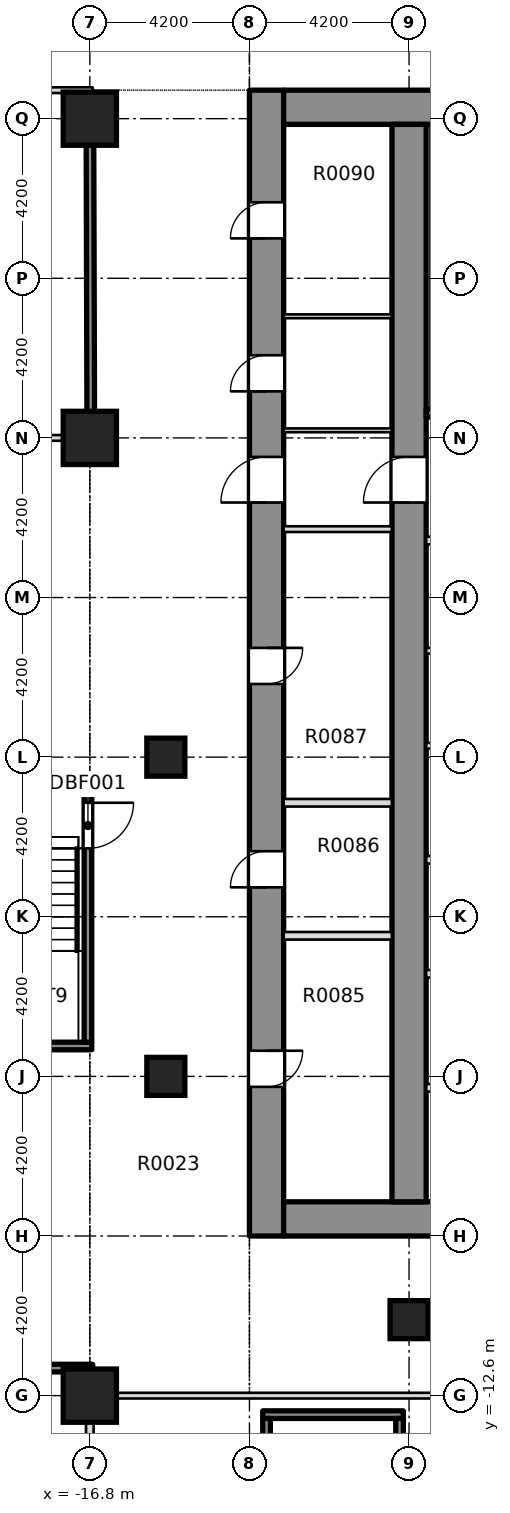
"""IFC4 building model, lengths in metres.
Left out: names, types, materials, properties, quantities, classifications, styles, units other than length and angle.
Written with IfcOpenShell. Run it as: python <this file> out.ifc"""

import sys

from ifc_helpers import new_model, si_unit, direction, frame, frame_2d, origin, origin_2d, place, context, subcontext, project, spatial, rectangle, extrude, element, fill, save


model = new_model("IFC4")
c1 = context("Model", 3, precision=1e-05, world=origin(), true_north=direction((0.0, 1.0)))
c2 = subcontext(c1, "Body", "Model", "MODEL_VIEW")
j1 = project(units=[si_unit("LENGTHUNIT", "METRE"), si_unit("PLANEANGLEUNIT", "RADIAN")], contexts=[c1])
p1 = place(None, origin())
s1 = spatial("IfcSite", under=j1, at=p1, CompositionType="ELEMENT")
p2 = place(p1, origin())
s2 = spatial("IfcBuilding", under=s1, at=p2, CompositionType="ELEMENT")
p3 = place(p2, origin())
s3 = spatial("IfcBuildingStorey", under=s2, at=p3, CompositionType="ELEMENT", Elevation=0.0)
p4 = place(p3, frame((-12.15, -8.4, -0.45), z_axis=(0.0, 0.0, 1.0), x_axis=(0.0, 1.0, 0.0)))
e1 = element("IfcWall", 1, at=p4, inside=s3, PredefinedType="SHEAR", context=c2, shape_type="SweptSolid", body=[
    extrude(rectangle(XDim=30.15, YDim=0.9, at=frame_2d((15.075, 0.0))), origin(), (0.0, 0.0, 1.0), 7.55),
])
p5 = place(p4, frame((3.925, 0.0, 0.45)))
e2 = element("IfcOpeningElement", 2, at=p5, cuts=e1, PredefinedType="OPENING", context=c2, shape_type="SweptSolid", body=[
    extrude(rectangle(XDim=0.95, YDim=2.1, at=frame_2d((0.475, 1.05))), frame((0.0, 0.46, 0.0), z_axis=(0.0, -1.0, 0.0), x_axis=(1.0, 0.0, 0.0)), (0.0, 0.0, 1.0), 0.92),
])
p6 = place(p4, frame((9.175, 0.0, 0.45)))
e3 = element("IfcOpeningElement", 3, at=p6, cuts=e1, PredefinedType="OPENING", context=c2, shape_type="SweptSolid", body=[
    extrude(rectangle(XDim=0.95, YDim=2.1, at=frame_2d((0.475, 1.05))), frame((0.0, 0.46, 0.0), z_axis=(0.0, -1.0, 0.0), x_axis=(1.0, 0.0, 0.0)), (0.0, 0.0, 1.0), 0.92),
])
p7 = place(p4, frame((14.525, 0.0, 0.45)))
e4 = element("IfcOpeningElement", 4, at=p7, cuts=e1, PredefinedType="OPENING", context=c2, shape_type="SweptSolid", body=[
    extrude(rectangle(XDim=0.95, YDim=2.1, at=frame_2d((0.475, 1.05))), frame((0.0, 0.46, 0.0), z_axis=(0.0, -1.0, 0.0), x_axis=(1.0, 0.0, 0.0)), (0.0, 0.0, 1.0), 0.92),
])
p8 = place(p4, frame((22.225, 0.0, 0.45)))
e5 = element("IfcOpeningElement", 5, at=p8, cuts=e1, PredefinedType="OPENING", context=c2, shape_type="SweptSolid", body=[
    extrude(rectangle(XDim=0.95, YDim=2.1, at=frame_2d((0.475, 1.05))), frame((0.0, 0.46, 0.0), z_axis=(0.0, -1.0, 0.0), x_axis=(1.0, 0.0, 0.0)), (0.0, 0.0, 1.0), 0.92),
])
p9 = place(p4, frame((26.25, 0.0, 0.45)))
e6 = element("IfcOpeningElement", 6, at=p9, cuts=e1, PredefinedType="OPENING", context=c2, shape_type="SweptSolid", body=[
    extrude(rectangle(XDim=0.95, YDim=2.1, at=frame_2d((0.475, 1.05))), frame((0.0, 0.46, 0.0), z_axis=(0.0, -1.0, 0.0), x_axis=(1.0, 0.0, 0.0)), (0.0, 0.0, 1.0), 0.92),
])
p10 = place(p4, frame((19.3, 0.0, 0.45)))
e7 = element("IfcOpeningElement", 7, at=p10, cuts=e1, PredefinedType="OPENING", context=c2, shape_type="SweptSolid", body=[
    extrude(rectangle(XDim=1.2, YDim=2.1, at=frame_2d((0.6, 1.05))), frame((0.0, 0.46, 0.0), z_axis=(0.0, -1.0, 0.0), x_axis=(1.0, 0.0, 0.0)), (0.0, 0.0, 1.0), 0.92),
])
p11 = place(p3, frame((-11.7, -7.95, -0.45), z_axis=(0.0, 0.0, 1.0), x_axis=(1.0, 0.0, 0.0)))
e8 = element("IfcWall", 8, at=p11, inside=s3, PredefinedType="SHEAR", context=c2, shape_type="SweptSolid", body=[
    extrude(rectangle(XDim=23.4, YDim=0.9, at=frame_2d((11.7, 0.0))), origin(), (0.0, 0.0, 1.0), 7.55),
])
p12 = place(p11, frame((6.95, 0.0, 0.45)))
e9 = element("IfcOpeningElement", 9, at=p12, cuts=e8, PredefinedType="OPENING", context=c2, shape_type="SweptSolid", body=[
    extrude(rectangle(XDim=1.8, YDim=2.1, at=frame_2d((0.9, 1.05))), frame((0.0, 0.46, 0.0), z_axis=(0.0, -1.0, 0.0), x_axis=(1.0, 0.0, 0.0)), (0.0, 0.0, 1.0), 0.92),
])
p13 = place(p11, frame((14.65, 0.0, 0.45)))
e10 = element("IfcOpeningElement", 10, at=p13, cuts=e8, PredefinedType="OPENING", context=c2, shape_type="SweptSolid", body=[
    extrude(rectangle(XDim=1.8, YDim=2.1, at=frame_2d((0.9, 1.05))), frame((0.0, 0.46, 0.0), z_axis=(0.0, -1.0, 0.0), x_axis=(1.0, 0.0, 0.0)), (0.0, 0.0, 1.0), 0.92),
])
p14 = place(p3, frame((-11.7, 21.3, -0.45), z_axis=(0.0, 0.0, 1.0), x_axis=(1.0, 0.0, 0.0)))
e11 = element("IfcWall", 11, at=p14, inside=s3, PredefinedType="SOLIDWALL", context=c2, shape_type="SweptSolid", body=[
    extrude(rectangle(XDim=23.4, YDim=0.9, at=frame_2d((11.7, 0.0))), origin(), (0.0, 0.0, 1.0), 7.55),
])
p15 = place(p14, frame((11.1, 0.0, 0.45)))
e12 = element("IfcOpeningElement", 12, at=p15, cuts=e11, PredefinedType="OPENING", context=c2, shape_type="SweptSolid", body=[
    extrude(rectangle(XDim=1.2, YDim=2.1, at=frame_2d((0.6, 1.05))), frame((0.0, 0.46, 0.0), z_axis=(0.0, -1.0, 0.0), x_axis=(1.0, 0.0, 0.0)), (0.0, 0.0, 1.0), 0.92),
])
p16 = place(p3, frame((-8.4, -7.5, -0.45), z_axis=(0.0, 0.0, 1.0), x_axis=(0.0, 1.0, 0.0)))
e13 = element("IfcWall", 13, at=p16, inside=s3, PredefinedType="SHEAR", context=c2, shape_type="SweptSolid", body=[
    extrude(rectangle(XDim=28.35, YDim=0.9, at=frame_2d((14.175, 0.0))), origin(), (0.0, 0.0, 1.0), 7.55),
])
p17 = place(p16, frame((18.4, 0.0, 0.45)))
e14 = element("IfcOpeningElement", 14, at=p17, cuts=e13, PredefinedType="OPENING", context=c2, shape_type="SweptSolid", body=[
    extrude(rectangle(XDim=1.2, YDim=2.1, at=frame_2d((0.6, 1.05))), frame((0.0, 0.46, 0.0), z_axis=(0.0, -1.0, 0.0), x_axis=(1.0, 0.0, 0.0)), (0.0, 0.0, 1.0), 0.92),
])
for number, where, z_axis, x_axis in (
    (15, (-16.8, -12.6, -0.45), (0.0, 0.0, 1.0), (1.0, 0.0, 0.0)),
    (16, (-16.8, 12.6, -0.45), (0.0, 0.0, 1.0), (1.0, 0.0, 0.0)),
    (17, (-16.8, 21.0, -0.45), (0.0, 0.0, 1.0), (1.0, 0.0, 0.0)),
):
    element("IfcColumn", number, at=place(p3, frame(where, z_axis=z_axis, x_axis=x_axis)), inside=s3, PredefinedType="COLUMN", context=c2, shape_type="SweptSolid", body=[
        extrude(rectangle(XDim=1.4, YDim=1.4, at=origin_2d()), origin(), (0.0, 0.0, 1.0), 7.55),
    ])
for number, where, z_axis, x_axis in (
    (18, (-8.4, -10.6, -0.45), (0.0, 0.0, 1.0), (1.0, 0.0, 0.0)),
    (19, (-14.8, -4.2, -0.45), (0.0, 0.0, 1.0), (1.0, 0.0, 0.0)),
    (20, (-14.8, 4.2, -0.45), (0.0, 0.0, 1.0), (1.0, 0.0, 0.0)),
):
    element("IfcColumn", number, at=place(p3, frame(where, z_axis=z_axis, x_axis=x_axis)), inside=s3, PredefinedType="COLUMN", context=c2, shape_type="SweptSolid", body=[
        extrude(rectangle(XDim=1.0, YDim=1.0, at=origin_2d()), origin(), (0.0, 0.0, 1.0), 7.55),
    ])
p18 = place(p3, frame((-16.9, -12.6, 0.0), z_axis=(0.0, 0.0, 1.0), x_axis=(1.0, 0.0, 0.0)))
e21 = element("IfcWall", 21, at=p18, inside=s3, PredefinedType="PARTITIONING", context=c2, shape_type="SweptSolid", body=[
    extrude(rectangle(XDim=9.625, YDim=0.15, at=frame_2d((4.812, 0.0))), origin(), (0.0, 0.0, 1.0), 7.1),
])
p19 = place(p3, frame((-34.15, -11.875, 0.0), z_axis=(0.0, 0.0, 1.0), x_axis=(1.0, 0.0, 0.0)))
e22 = element("IfcWall", 22, at=p19, inside=s3, PredefinedType="SOLIDWALL", context=c2, shape_type="SweptSolid", body=[
    extrude(rectangle(XDim=17.425, YDim=0.2, at=frame_2d((8.712, 0.0))), origin(), (0.0, 0.0, 1.0), 7.1),
])
p20 = place(p19, frame((2.45, 0.0, 0.0)))
e23 = element("IfcOpeningElement", 23, at=p20, cuts=e22, PredefinedType="OPENING", context=c2, shape_type="SweptSolid", body=[
    extrude(rectangle(XDim=0.9, YDim=2.1, at=frame_2d((0.45, 1.05))), frame((0.0, 0.11, 0.0), z_axis=(0.0, -1.0, 0.0), x_axis=(1.0, 0.0, 0.0)), (0.0, 0.0, 1.0), 0.22),
])
p21 = place(p3, frame((-34.15, 12.6, 0.0), z_axis=(0.0, 0.0, 1.0), x_axis=(1.0, 0.0, 0.0)))
e24 = element("IfcWall", 24, at=p21, inside=s3, PredefinedType="PARTITIONING", context=c2, shape_type="SweptSolid", body=[
    extrude(rectangle(XDim=17.425, YDim=0.15, at=frame_2d((8.712, 0.0))), origin(), (0.0, 0.0, 1.0), 7.1),
])
p22 = place(p21, frame((10.65, 0.0, 0.0)))
e25 = element("IfcOpeningElement", 25, at=p22, cuts=e24, PredefinedType="OPENING", context=c2, shape_type="SweptSolid", body=[
    extrude(rectangle(XDim=0.9, YDim=2.1, at=frame_2d((0.45, 1.05))), frame((0.0, 0.085, 0.0), z_axis=(0.0, -1.0, 0.0), x_axis=(1.0, 0.0, 0.0)), (0.0, 0.0, 1.0), 0.17),
])
p23 = place(p3, frame((-34.15, 21.75, 0.0), z_axis=(0.0, 0.0, 1.0), x_axis=(1.0, 0.0, 0.0)))
e26 = element("IfcWall", 26, at=p23, inside=s3, PredefinedType="PARTITIONING", context=c2, shape_type="SweptSolid", body=[
    extrude(rectangle(XDim=17.425, YDim=0.15, at=frame_2d((8.712, 0.0))), origin(), (0.0, 0.0, 1.0), 7.1),
])
p24 = place(p23, frame((4.05, 0.0, 0.0)))
e27 = element("IfcOpeningElement", 27, at=p24, cuts=e26, PredefinedType="OPENING", context=c2, shape_type="SweptSolid", body=[
    extrude(rectangle(XDim=0.9, YDim=2.1, at=frame_2d((0.45, 1.05))), frame((0.0, 0.085, 0.0), z_axis=(0.0, -1.0, 0.0), x_axis=(1.0, 0.0, 0.0)), (0.0, 0.0, 1.0), 0.17),
])
p25 = place(p23, frame((14.825, 0.0, 0.0)))
e28 = element("IfcOpeningElement", 28, at=p25, cuts=e26, PredefinedType="OPENING", context=c2, shape_type="SweptSolid", body=[
    extrude(rectangle(XDim=0.9, YDim=2.1, at=frame_2d((0.45, 1.05))), frame((0.0, 0.085, 0.0), z_axis=(0.0, -1.0, 0.0), x_axis=(1.0, 0.0, 0.0)), (0.0, 0.0, 1.0), 0.17),
])
p26 = place(p3, frame((-16.8, -18.125, 0.0), z_axis=(0.0, 0.0, 1.0), x_axis=(0.0, 1.0, 0.0)))
e29 = element("IfcWall", 29, at=p26, inside=s3, PredefinedType="PARTITIONING", context=c2, shape_type="SweptSolid", body=[
    extrude(rectangle(XDim=5.45, YDim=0.2, at=frame_2d((2.725, 0.0))), origin(), (0.0, 0.0, 1.0), 7.1),
])
p27 = place(p3, frame((-16.775, -12.525, 0.0), z_axis=(0.0, 0.0, 1.0), x_axis=(-0.043289881256, 0.999062553688, 0.0)))
e30 = element("IfcWall", 30, at=p27, inside=s3, PredefinedType="SOLIDWALL", context=c2, shape_type="SweptSolid", body=[
    extrude(rectangle(XDim=0.575, YDim=0.2, at=frame_2d((0.288, 0.0))), origin(), (0.0, 0.0, 1.0), 7.1),
])
p28 = place(p3, frame((-16.775, 12.675, 0.0), z_axis=(0.0, 0.0, 1.0), x_axis=(-0.002759281819, 0.999996193175, 0.0)))
e31 = element("IfcWall", 31, at=p28, inside=s3, PredefinedType="SOLIDWALL", context=c2, shape_type="SweptSolid", body=[
    extrude(rectangle(XDim=9.025, YDim=0.2, at=frame_2d((4.512, 0.0))), origin(), (0.0, 0.0, 1.0), 7.1),
])
for number, where, z_axis, x_axis in (
    (32, (-7.949, -4.5, 0.0), (0.0, 0.0, 1.0), (1.0, 0.0, 0.0)),
    (33, (-7.949, -1.5, 0.0), (0.0, 0.0, 1.0), (1.0, 0.0, 0.0)),
    (34, (-7.949, 1.5, 0.0), (0.0, 0.0, 1.0), (1.0, 0.0, 0.0)),
):
    element("IfcWall", number, at=place(p3, frame(where, z_axis=z_axis, x_axis=x_axis)), inside=s3, PredefinedType="PARTITIONING", context=c2, shape_type="SweptSolid", body=[
        extrude(rectangle(XDim=2.374, YDim=0.2, at=frame_2d((1.187, 0.0))), origin(), (0.0, 0.0, 1.0), 7.1),
    ])
p29 = place(p3, frame((-7.949, 4.5, 0.0), z_axis=(0.0, 0.0, 1.0), x_axis=(1.0, 0.0, 0.0)))
e35 = element("IfcWall", 35, at=p29, inside=s3, PredefinedType="PARTITIONING", context=c2, shape_type="SweptSolid", body=[
    extrude(rectangle(XDim=2.524, YDim=0.15, at=frame_2d((1.262, 0.0))), origin(), (0.0, 0.0, 1.0), 7.1),
])
p30 = place(p3, frame((-7.949, 7.0, 0.0), z_axis=(0.0, 0.0, 1.0), x_axis=(1.0, 0.0, 0.0)))
e36 = element("IfcWall", 36, at=p30, inside=s3, PredefinedType="PARTITIONING", context=c2, shape_type="SweptSolid", body=[
    extrude(rectangle(XDim=15.898, YDim=0.15, at=frame_2d((7.949, 0.0))), origin(), (0.0, 0.0, 1.0), 7.1),
])
p31 = place(p30, frame((7.249, 0.0, 0.0)))
e37 = element("IfcOpeningElement", 37, at=p31, cuts=e36, PredefinedType="OPENING", context=c2, shape_type="SweptSolid", body=[
    extrude(rectangle(XDim=1.4, YDim=2.1, at=frame_2d((0.7, 1.05))), frame((0.0, 0.085, 0.0), z_axis=(0.0, -1.0, 0.0), x_axis=(1.0, 0.0, 0.0)), (0.0, 0.0, 1.0), 0.17),
])
p32 = place(p3, frame((-7.949, 9.9, 0.0), z_axis=(0.0, 0.0, 1.0), x_axis=(1.0, 0.0, 0.0)))
e38 = element("IfcWall", 38, at=p32, inside=s3, PredefinedType="PARTITIONING", context=c2, shape_type="SweptSolid", body=[
    extrude(rectangle(XDim=4.349, YDim=0.2, at=frame_2d((2.174, 0.0))), origin(), (0.0, 0.0, 1.0), 7.1),
])
p33 = place(p32, frame((0.999, 0.0, 0.0)))
e39 = element("IfcOpeningElement", 39, at=p33, cuts=e38, PredefinedType="OPENING", context=c2, shape_type="SweptSolid", body=[
    extrude(rectangle(XDim=1.1, YDim=2.1, at=frame_2d((0.55, 1.05))), frame((0.0, 0.11, 0.0), z_axis=(0.0, -1.0, 0.0), x_axis=(1.0, 0.0, 0.0)), (0.0, 0.0, 1.0), 0.22),
])
p34 = place(p3, frame((-7.949, 13.25, 0.0), z_axis=(0.0, 0.0, 1.0), x_axis=(1.0, 0.0, 0.0)))
e40 = element("IfcWall", 40, at=p34, inside=s3, PredefinedType="SOLIDWALL", context=c2, shape_type="SweptSolid", body=[
    extrude(rectangle(XDim=4.524, YDim=0.2, at=frame_2d((2.262, 0.0))), origin(), (0.0, 0.0, 1.0), 7.1),
])
p35 = place(p34, frame((1.499, 0.0, 0.0)))
e41 = element("IfcOpeningElement", 41, at=p35, cuts=e40, PredefinedType="OPENING", context=c2, shape_type="SweptSolid", body=[
    extrude(rectangle(XDim=1.2, YDim=2.1, at=frame_2d((0.6, 1.05))), frame((0.0, 0.11, 0.0), z_axis=(0.0, -1.0, 0.0), x_axis=(1.0, 0.0, 0.0)), (0.0, 0.0, 1.0), 0.22),
])
for number, where, z_axis, x_axis in (
    (42, (-11.699, -0.5, 0.0), (0.0, 0.0, 1.0), (1.0, 0.0, 0.0)),
    (43, (-11.699, 3.0, 0.0), (0.0, 0.0, 1.0), (1.0, 0.0, 0.0)),
):
    element("IfcWall", number, at=place(p3, frame(where, z_axis=z_axis, x_axis=x_axis)), inside=s3, PredefinedType="PARTITIONING", context=c2, shape_type="SweptSolid", body=[
        extrude(rectangle(XDim=2.848, YDim=0.2, at=frame_2d((1.424, 0.0))), origin(), (0.0, 0.0, 1.0), 7.1),
    ])
p36 = place(p3, frame((-11.699, 10.2, 0.0), z_axis=(0.0, 0.0, 1.0), x_axis=(1.0, 0.0, 0.0)))
e44 = element("IfcWall", 44, at=p36, inside=s3, PredefinedType="PARTITIONING", context=c2, shape_type="SweptSolid", body=[
    extrude(rectangle(XDim=2.848, YDim=0.15, at=frame_2d((1.424, 0.0))), origin(), (0.0, 0.0, 1.0), 7.1),
])
for number, where, z_axis, x_axis in (
    (45, (-11.699, 12.8, 0.0), (0.0, 0.0, 1.0), (1.0, 0.0, 0.0)),
    (46, (-11.699, 15.8, 0.0), (0.0, 0.0, 1.0), (1.0, 0.0, 0.0)),
):
    element("IfcWall", number, at=place(p3, frame(where, z_axis=z_axis, x_axis=x_axis)), inside=s3, PredefinedType="PARTITIONING", context=c2, shape_type="SweptSolid", body=[
        extrude(rectangle(XDim=2.848, YDim=0.1, at=frame_2d((1.424, 0.0))), origin(), (0.0, 0.0, 1.0), 7.1),
    ])
p37 = place(p3, frame((-12.25, -13.1, 0.0), z_axis=(0.0, 0.0, 1.0), x_axis=(1.0, 0.0, 0.0)))
e47 = element("IfcWall", 47, at=p37, inside=s3, PredefinedType="SOLIDWALL", context=c2, shape_type="SweptSolid", body=[
    extrude(rectangle(XDim=3.7, YDim=0.2, at=frame_2d((1.85, 0.0))), origin(), (0.0, 0.0, 1.0), 7.1),
])
p38 = place(p3, frame((-12.15, -19.8, 0.0), z_axis=(0.0, 0.0, 1.0), x_axis=(0.0, 1.0, 0.0)))
e48 = element("IfcWall", 48, at=p38, inside=s3, PredefinedType="SOLIDWALL", context=c2, shape_type="SweptSolid", body=[
    extrude(rectangle(XDim=6.6, YDim=0.2, at=frame_2d((3.3, 0.0))), origin(), (0.0, 0.0, 1.0), 7.1),
])
p39 = place(p3, frame((-8.65, -20.3, 0.0), z_axis=(0.0, 0.0, 1.0), x_axis=(0.0, 1.0, 0.0)))
e49 = element("IfcWall", 49, at=p39, inside=s3, PredefinedType="SOLIDWALL", context=c2, shape_type="SweptSolid", body=[
    extrude(rectangle(XDim=7.1, YDim=0.2, at=frame_2d((3.55, 0.0))), origin(), (0.0, 0.0, 1.0), 7.1),
])
for number, where, z_axis, x_axis in (
    (50, (-20.45, -3.4, 0.0), (0.0, 0.0, 1.0), (1.0, 0.0, 0.0)),
    (51, (-20.45, 3.4, 0.0), (0.0, 0.0, 1.0), (1.0, 0.0, 0.0)),
):
    element("IfcWall", number, at=place(p3, frame(where, z_axis=z_axis, x_axis=x_axis)), inside=s3, PredefinedType="SOLIDWALL", context=c2, shape_type="SweptSolid", body=[
        extrude(rectangle(XDim=3.7, YDim=0.2, at=frame_2d((1.85, 0.0))), origin(), (0.0, 0.0, 1.0), 7.1),
    ])
p40 = place(p3, frame((-16.85, -3.3, 0.0), z_axis=(0.0, 0.0, 1.0), x_axis=(0.0, 1.0, 0.0)))
e52 = element("IfcWall", 52, at=p40, inside=s3, PredefinedType="SOLIDWALL", context=c2, shape_type="SweptSolid", body=[
    extrude(rectangle(XDim=6.6, YDim=0.2, at=frame_2d((3.3, 0.0))), origin(), (0.0, 0.0, 1.0), 7.1),
])
p41 = place(p40, frame((5.1, 0.0, 0.0)))
e53 = element("IfcOpeningElement", 53, at=p41, cuts=e52, PredefinedType="OPENING", context=c2, shape_type="SweptSolid", body=[
    extrude(rectangle(XDim=1.2, YDim=2.1, at=frame_2d((0.6, 1.05))), frame((0.0, 0.11, 0.0), z_axis=(0.0, -1.0, 0.0), x_axis=(1.0, 0.0, 0.0)), (0.0, 0.0, 1.0), 0.22),
])
p42 = place(p5, origin())
e54 = element("IfcDoor", 54, at=p42, inside=s3, OperationType="SINGLE_SWING_LEFT", PredefinedType="DOOR", context=c2, shape_type="SweptSolid", body=[
    extrude(rectangle(XDim=0.95, YDim=2.1, at=frame_2d((0.475, 1.05))), frame((0.0, 0.025, 0.0), z_axis=(0.0, -1.0, 0.0), x_axis=(1.0, 0.0, 0.0)), (0.0, 0.0, 1.0), 0.05),
])
fill(e2, e54)
p43 = place(p6, origin())
e55 = element("IfcDoor", 55, at=p43, inside=s3, OperationType="SINGLE_SWING_LEFT", PredefinedType="DOOR", context=c2, shape_type="SweptSolid", body=[
    extrude(rectangle(XDim=0.95, YDim=2.1, at=frame_2d((0.475, 1.05))), frame((0.0, 0.025, 0.0), z_axis=(0.0, -1.0, 0.0), x_axis=(1.0, 0.0, 0.0)), (0.0, 0.0, 1.0), 0.05),
])
fill(e3, e55)
p44 = place(p7, origin())
e56 = element("IfcDoor", 56, at=p44, inside=s3, OperationType="SINGLE_SWING_LEFT", PredefinedType="DOOR", context=c2, shape_type="SweptSolid", body=[
    extrude(rectangle(XDim=0.95, YDim=2.1, at=frame_2d((0.475, 1.05))), frame((0.0, 0.025, 0.0), z_axis=(0.0, -1.0, 0.0), x_axis=(1.0, 0.0, 0.0)), (0.0, 0.0, 1.0), 0.05),
])
fill(e4, e56)
p45 = place(p8, origin())
e57 = element("IfcDoor", 57, at=p45, inside=s3, OperationType="SINGLE_SWING_LEFT", PredefinedType="DOOR", context=c2, shape_type="SweptSolid", body=[
    extrude(rectangle(XDim=0.95, YDim=2.1, at=frame_2d((0.475, 1.05))), frame((0.0, 0.025, 0.0), z_axis=(0.0, -1.0, 0.0), x_axis=(1.0, 0.0, 0.0)), (0.0, 0.0, 1.0), 0.05),
])
fill(e5, e57)
p46 = place(p9, origin())
e58 = element("IfcDoor", 58, at=p46, inside=s3, OperationType="SINGLE_SWING_LEFT", PredefinedType="DOOR", context=c2, shape_type="SweptSolid", body=[
    extrude(rectangle(XDim=0.95, YDim=2.1, at=frame_2d((0.475, 1.05))), frame((0.0, 0.025, 0.0), z_axis=(0.0, -1.0, 0.0), x_axis=(1.0, 0.0, 0.0)), (0.0, 0.0, 1.0), 0.05),
])
fill(e6, e58)
p47 = place(p10, origin())
e59 = element("IfcDoor", 59, at=p47, inside=s3, OperationType="SINGLE_SWING_LEFT", PredefinedType="DOOR", context=c2, shape_type="SweptSolid", body=[
    extrude(rectangle(XDim=1.2, YDim=2.1, at=frame_2d((0.6, 1.05))), frame((0.0, 0.025, 0.0), z_axis=(0.0, -1.0, 0.0), x_axis=(1.0, 0.0, 0.0)), (0.0, 0.0, 1.0), 0.05),
])
fill(e7, e59)
p48 = place(p17, origin())
e60 = element("IfcDoor", 60, at=p48, inside=s3, OperationType="SINGLE_SWING_LEFT", PredefinedType="DOOR", context=c2, shape_type="SweptSolid", body=[
    extrude(rectangle(XDim=1.2, YDim=2.1, at=frame_2d((0.6, 1.05))), frame((0.0, 0.025, 0.0), z_axis=(0.0, -1.0, 0.0), x_axis=(1.0, 0.0, 0.0)), (0.0, 0.0, 1.0), 0.05),
])
fill(e14, e60)
p49 = place(p41, origin())
e61 = element("IfcDoor", 61, at=p49, inside=s3, OperationType="SINGLE_SWING_LEFT", PredefinedType="DOOR", context=c2, shape_type="SweptSolid", body=[
    extrude(rectangle(XDim=1.2, YDim=2.1, at=frame_2d((0.6, 1.05))), frame((0.0, 0.025, 0.0), z_axis=(0.0, -1.0, 0.0), x_axis=(1.0, 0.0, 0.0)), (0.0, 0.0, 1.0), 0.05),
])
fill(e53, e61)
save(model, sys.argv[1])
